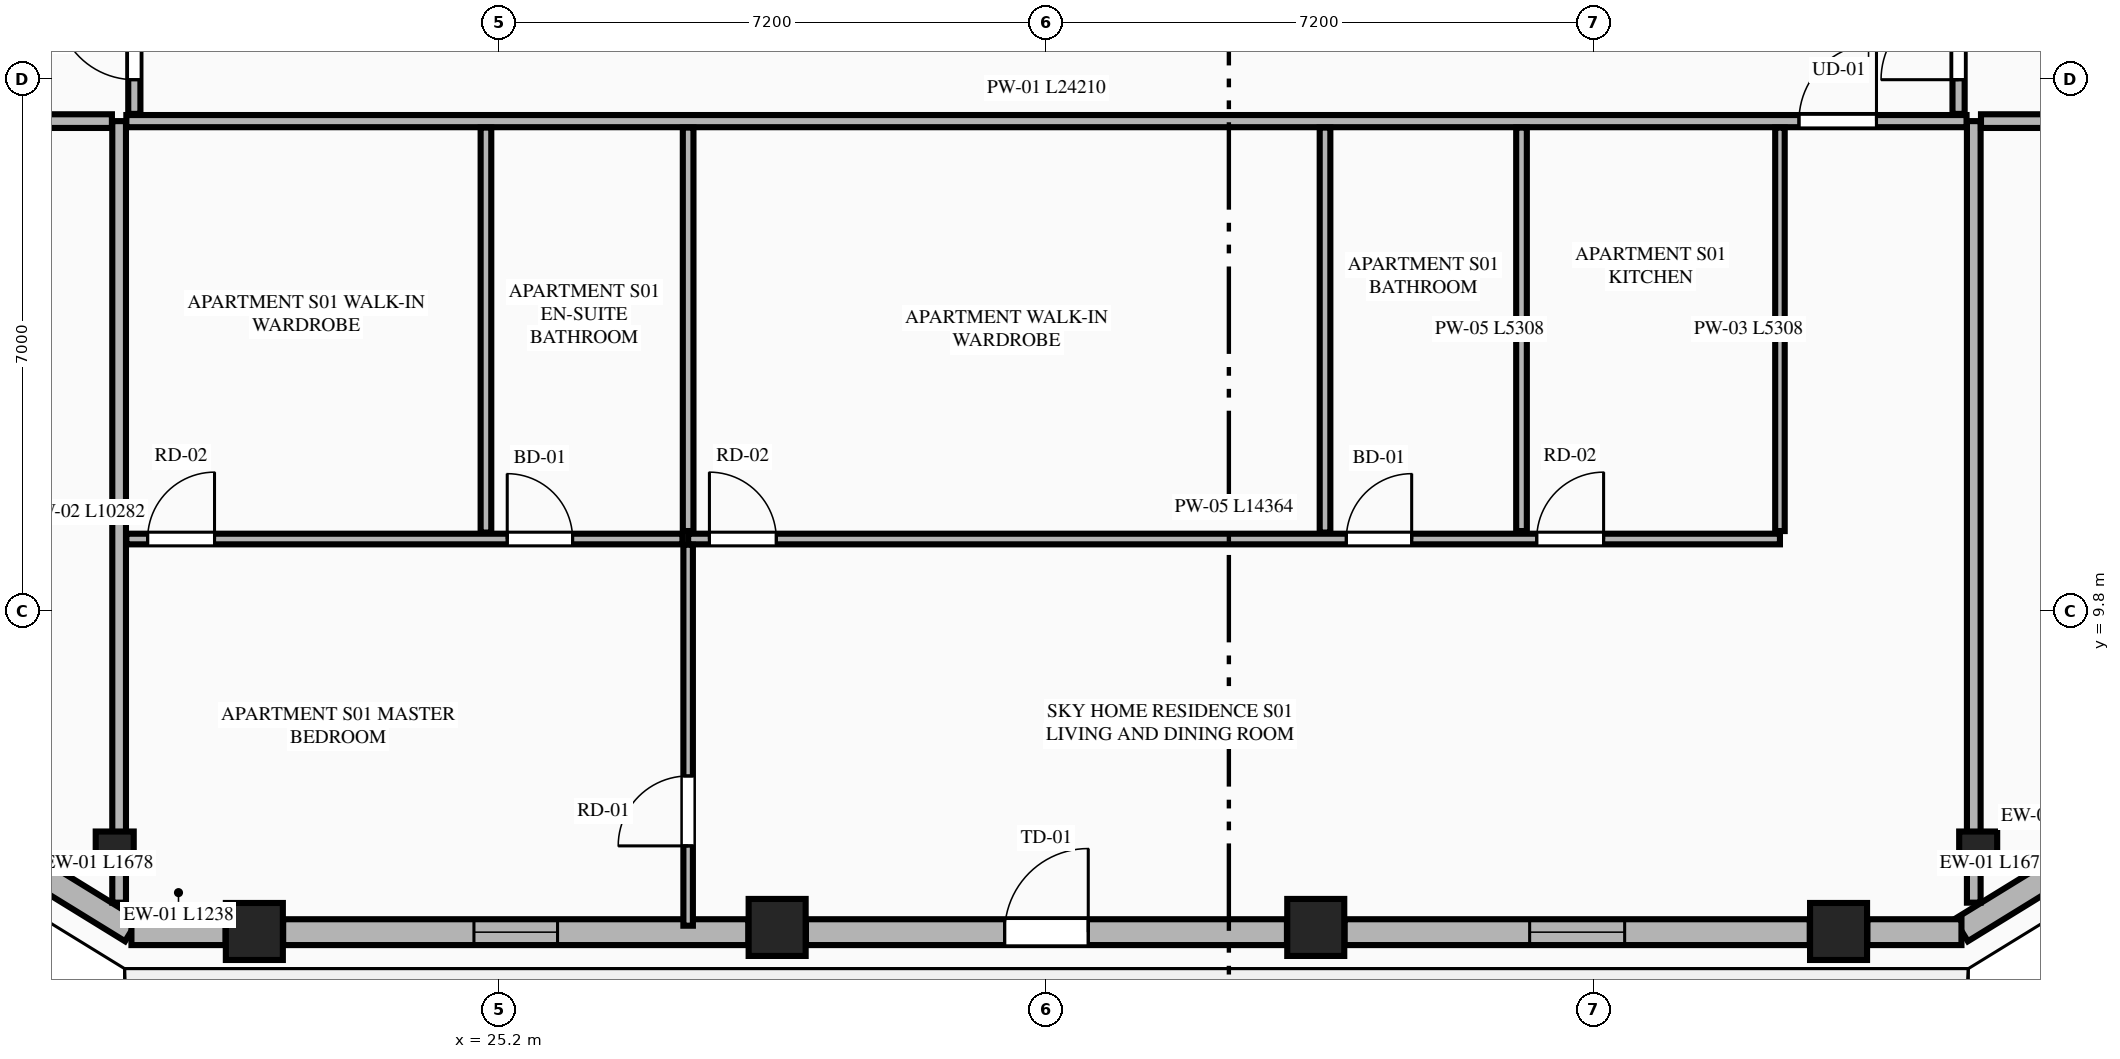
"""IFC4 building model, lengths in metres.
Left out: names, types, materials, properties, quantities, classifications, styles, units other than length and angle.
Written with IfcOpenShell. Run it as: python <this file> out.ifc"""

import sys

from ifc_helpers import new_model, si_unit, direction, frame, frame_2d, origin, origin_2d, place, context, subcontext, project, spatial, rectangle, extrude, element, fill, save


model = new_model("IFC4")
c1 = context("Model", 3, precision=1e-05, world=origin(), true_north=direction((0.0, 1.0)))
c2 = subcontext(c1, "Body", "Model", "MODEL_VIEW")
j1 = project(units=[si_unit("LENGTHUNIT", "METRE"), si_unit("PLANEANGLEUNIT", "RADIAN")], contexts=[c1])
p1 = place(None, origin())
s1 = spatial("IfcSite", under=j1, at=p1, CompositionType="ELEMENT")
p2 = place(p1, origin())
s2 = spatial("IfcBuilding", under=s1, at=p2, CompositionType="ELEMENT")
p3 = place(p2, frame((0.0, 0.0, 207.4)))
s3 = spatial("IfcBuildingStorey", under=s2, at=p3, CompositionType="ELEMENT", Elevation=207.4)
for number, where, z_axis, x_axis in (
    (1, (21.979, 5.589, 0.0), (0.0, 0.0, 1.0), (1.0, 0.0, 0.0)),
    (2, (28.857, 5.642, 0.0), (0.0, 0.0, 1.0), (1.0, 0.0, 0.0)),
    (3, (35.943, 5.642, 0.0), (0.0, 0.0, 1.0), (1.0, 0.0, 0.0)),
    (4, (42.821, 5.589, 0.0), (0.0, 0.0, 1.0), (1.0, 0.0, 0.0)),
):
    element("IfcColumn", number, at=place(p3, frame(where, z_axis=z_axis, x_axis=x_axis)), inside=s3, PredefinedType="COLUMN", context=c2, shape_type="SweptSolid", body=[
        extrude(rectangle(XDim=0.75, YDim=0.75, at=origin_2d()), origin(), (0.0, 0.0, 1.0), 3.55),
    ])
for number, where, z_axis, x_axis in (
    (5, (20.142, 6.654, 0.0), (0.0, 0.0, 1.0), (0.865, -0.501, 0.0)),
    (6, (44.658, 6.654, 0.0), (0.0, 0.0, 1.0), (0.865, 0.501, 0.0)),
):
    element("IfcColumn", number, at=place(p3, frame(where, z_axis=z_axis, x_axis=x_axis)), inside=s3, PredefinedType="PILASTER", context=c2, shape_type="SweptSolid", body=[
        extrude(rectangle(XDim=0.5, YDim=0.35, at=origin_2d()), origin(), (0.0, 0.0, 1.0), 3.55),
    ])
for number, where, z_axis, x_axis in (
    (7, (18.938, 6.484, 0.0), (0.0, 0.0, 1.0), (0.852, -0.524, 0.0)),
    (8, (44.433, 5.605, 0.0), (0.0, 0.0, 1.0), (0.852, 0.524, 0.0)),
):
    element("IfcWall", number, at=place(p3, frame(where, z_axis=z_axis, x_axis=x_axis)), inside=s3, PredefinedType="STANDARD", context=c2, shape_type="SweptSolid", body=[
        extrude(rectangle(XDim=1.678, YDim=0.34, at=frame_2d((0.839, 0.0))), origin(), (0.0, 0.0, 1.0), 3.35),
    ])
p4 = place(p3, frame((20.362, 5.58, 0.0), z_axis=(0.0, 0.0, 1.0), x_axis=(1.0, 0.0, 0.0)))
e9 = element("IfcWall", 9, at=p4, inside=s3, PredefinedType="STANDARD", context=c2, shape_type="SweptSolid", body=[
    extrude(rectangle(XDim=1.238, YDim=0.34, at=frame_2d((0.619, 0.0))), origin(), (0.0, 0.0, 1.0), 3.35),
])
p5 = place(p3, frame((22.358, 5.58, 0.0), z_axis=(0.0, 0.0, 1.0), x_axis=(1.0, 0.0, 0.0)))
e10 = element("IfcWall", 10, at=p5, inside=s3, PredefinedType="STANDARD", context=c2, shape_type="SweptSolid", body=[
    extrude(rectangle(XDim=6.12, YDim=0.34, at=frame_2d((3.06, 0.0))), origin(), (0.0, 0.0, 1.0), 2.883),
])
p6 = place(p5, frame((2.51, 0.0, 0.75)))
e11 = element("IfcOpeningElement", 11, at=p6, cuts=e10, PredefinedType="OPENING", context=c2, shape_type="SweptSolid", body=[
    extrude(rectangle(XDim=1.1, YDim=1.983, at=frame_2d((0.55, 0.991))), frame((0.0, 0.18, 0.0), z_axis=(0.0, -1.0, 0.0), x_axis=(1.0, 0.0, 0.0)), (0.0, 0.0, 1.0), 0.36),
])
p7 = place(p3, frame((29.236, 5.58, 0.0), z_axis=(0.0, 0.0, 1.0), x_axis=(1.0, 0.0, 0.0)))
e12 = element("IfcWall", 12, at=p7, inside=s3, PredefinedType="STANDARD", context=c2, shape_type="SweptSolid", body=[
    extrude(rectangle(XDim=6.328, YDim=0.34, at=frame_2d((3.164, 0.0))), origin(), (0.0, 0.0, 1.0), 2.883),
])
p8 = place(p7, frame((2.614, 0.0, 0.0)))
e13 = element("IfcOpeningElement", 13, at=p8, cuts=e12, PredefinedType="OPENING", context=c2, shape_type="SweptSolid", body=[
    extrude(rectangle(XDim=1.1, YDim=2.25, at=frame_2d((0.55, 1.125))), frame((0.0, 0.18, 0.0), z_axis=(0.0, -1.0, 0.0), x_axis=(1.0, 0.0, 0.0)), (0.0, 0.0, 1.0), 0.36),
])
p9 = place(p3, frame((36.322, 5.58, 0.0), z_axis=(0.0, 0.0, 1.0), x_axis=(1.0, 0.0, 0.0)))
e14 = element("IfcWall", 14, at=p9, inside=s3, PredefinedType="STANDARD", context=c2, shape_type="SweptSolid", body=[
    extrude(rectangle(XDim=6.12, YDim=0.34, at=frame_2d((3.06, 0.0))), origin(), (0.0, 0.0, 1.0), 2.883),
])
p10 = place(p9, frame((2.435, 0.0, 0.75)))
e15 = element("IfcOpeningElement", 15, at=p10, cuts=e14, PredefinedType="OPENING", context=c2, shape_type="SweptSolid", body=[
    extrude(rectangle(XDim=1.25, YDim=1.95, at=frame_2d((0.625, 0.975))), frame((0.0, 0.18, 0.0), z_axis=(0.0, -1.0, 0.0), x_axis=(1.0, 0.0, 0.0)), (0.0, 0.0, 1.0), 0.36),
])
p11 = place(p3, frame((43.2, 5.58, 0.0), z_axis=(0.0, 0.0, 1.0), x_axis=(1.0, 0.0, 0.0)))
e16 = element("IfcWall", 16, at=p11, inside=s3, PredefinedType="STANDARD", context=c2, shape_type="SweptSolid", body=[
    extrude(rectangle(XDim=1.238, YDim=0.34, at=frame_2d((0.619, 0.0))), origin(), (0.0, 0.0, 1.0), 3.35),
])
for number, where, z_axis, x_axis in (
    (17, (20.2, 5.968, 0.0), (0.0, 0.0, 1.0), (0.0, 1.0, 0.0)),
    (18, (44.6, 5.968, 0.0), (0.0, 0.0, 1.0), (0.0, 1.0, 0.0)),
):
    element("IfcWall", number, at=place(p3, frame(where, z_axis=z_axis, x_axis=x_axis)), inside=s3, PredefinedType="PARTITIONING", context=c2, shape_type="SweptSolid", body=[
        extrude(rectangle(XDim=10.282, YDim=0.18, at=frame_2d((5.141, 0.0))), origin(), (0.0, 0.0, 1.0), 3.35),
    ])
p12 = place(p3, frame((20.295, 16.25, 0.0), z_axis=(0.0, 0.0, 1.0), x_axis=(1.0, 0.0, 0.0)))
e19 = element("IfcWall", 19, at=p12, inside=s3, PredefinedType="PARTITIONING", context=c2, shape_type="SweptSolid", body=[
    extrude(rectangle(XDim=24.21, YDim=0.16, at=frame_2d((12.105, 0.0))), origin(), (0.0, 0.0, 1.0), 3.35),
])
p13 = place(p12, frame((22.005, 0.0, 0.0)))
e20 = element("IfcOpeningElement", 20, at=p13, cuts=e19, PredefinedType="OPENING", context=c2, shape_type="SweptSolid", body=[
    extrude(rectangle(XDim=1.02, YDim=2.25, at=frame_2d((0.51, 1.125))), frame((0.0, 0.09, 0.0), z_axis=(0.0, -1.0, 0.0), x_axis=(1.0, 0.0, 0.0)), (0.0, 0.0, 1.0), 0.18),
])
p14 = place(p3, frame((42.05, 10.857, 0.0), z_axis=(0.0, 0.0, 1.0), x_axis=(0.0, 1.0, 0.0)))
e21 = element("IfcWall", 21, at=p14, inside=s3, PredefinedType="PARTITIONING", context=c2, shape_type="SweptSolid", body=[
    extrude(rectangle(XDim=5.308, YDim=0.125, at=frame_2d((2.654, 0.0))), origin(), (0.0, 0.0, 1.0), 2.807),
])
p15 = place(p3, frame((27.686, 10.752, 0.0), z_axis=(0.0, 0.0, 1.0), x_axis=(1.0, 0.0, 0.0)))
e22 = element("IfcWall", 22, at=p15, inside=s3, PredefinedType="PLUMBINGWALL", context=c2, shape_type="SweptSolid", body=[
    extrude(rectangle(XDim=14.364, YDim=0.14, at=frame_2d((7.182, 0.0))), origin(), (0.0, 0.0, 1.0), 3.35),
])
p16 = place(p15, frame((0.28, 0.0, 0.0)))
e23 = element("IfcOpeningElement", 23, at=p16, cuts=e22, PredefinedType="OPENING", context=c2, shape_type="SweptSolid", body=[
    extrude(rectangle(XDim=0.88, YDim=2.15, at=frame_2d((0.44, 1.075))), frame((0.0, 0.08, 0.0), z_axis=(0.0, -1.0, 0.0), x_axis=(1.0, 0.0, 0.0)), (0.0, 0.0, 1.0), 0.16),
])
p17 = place(p15, frame((8.659, 0.0, 0.0)))
e24 = element("IfcOpeningElement", 24, at=p17, cuts=e22, PredefinedType="OPENING", context=c2, shape_type="SweptSolid", body=[
    extrude(rectangle(XDim=0.86, YDim=2.1, at=frame_2d((0.43, 1.05))), frame((0.0, 0.08, 0.0), z_axis=(0.0, -1.0, 0.0), x_axis=(1.0, 0.0, 0.0)), (0.0, 0.0, 1.0), 0.16),
])
p18 = place(p15, frame((11.164, 0.0, 0.0)))
e25 = element("IfcOpeningElement", 25, at=p18, cuts=e22, PredefinedType="OPENING", context=c2, shape_type="SweptSolid", body=[
    extrude(rectangle(XDim=0.88, YDim=2.15, at=frame_2d((0.44, 1.075))), frame((0.0, 0.08, 0.0), z_axis=(0.0, -1.0, 0.0), x_axis=(1.0, 0.0, 0.0)), (0.0, 0.0, 1.0), 0.16),
])
p19 = place(p3, frame((20.295, 10.752, 0.0), z_axis=(0.0, 0.0, 1.0), x_axis=(1.0, 0.0, 0.0)))
e26 = element("IfcWall", 26, at=p19, inside=s3, PredefinedType="PLUMBINGWALL", context=c2, shape_type="SweptSolid", body=[
    extrude(rectangle(XDim=7.316, YDim=0.14, at=frame_2d((3.658, 0.0))), origin(), (0.0, 0.0, 1.0), 3.35),
])
p20 = place(p19, frame((0.28, 0.0, 0.0)))
e27 = element("IfcOpeningElement", 27, at=p20, cuts=e26, PredefinedType="OPENING", context=c2, shape_type="SweptSolid", body=[
    extrude(rectangle(XDim=0.88, YDim=2.15, at=frame_2d((0.44, 1.075))), frame((0.0, 0.08, 0.0), z_axis=(0.0, -1.0, 0.0), x_axis=(1.0, 0.0, 0.0)), (0.0, 0.0, 1.0), 0.16),
])
p21 = place(p19, frame((5.011, 0.0, 0.0)))
e28 = element("IfcOpeningElement", 28, at=p21, cuts=e26, PredefinedType="OPENING", context=c2, shape_type="SweptSolid", body=[
    extrude(rectangle(XDim=0.86, YDim=2.1, at=frame_2d((0.43, 1.05))), frame((0.0, 0.08, 0.0), z_axis=(0.0, -1.0, 0.0), x_axis=(1.0, 0.0, 0.0)), (0.0, 0.0, 1.0), 0.16),
])
for number, where, z_axis, x_axis in (
    (29, (38.65, 10.857, 0.0), (0.0, 0.0, 1.0), (0.0, 1.0, 0.0)),
    (30, (27.686, 10.857, 0.0), (0.0, 0.0, 1.0), (0.0, 1.0, 0.0)),
):
    element("IfcWall", number, at=place(p3, frame(where, z_axis=z_axis, x_axis=x_axis)), inside=s3, PredefinedType="PLUMBINGWALL", context=c2, shape_type="SweptSolid", body=[
        extrude(rectangle(XDim=5.308, YDim=0.14, at=frame_2d((2.654, 0.0))), origin(), (0.0, 0.0, 1.0), 3.35),
    ])
p22 = place(p3, frame((27.686, 5.665, 0.0), z_axis=(0.0, 0.0, 1.0), x_axis=(0.0, 1.0, 0.0)))
e31 = element("IfcWall", 31, at=p22, inside=s3, PredefinedType="PARTITIONING", context=c2, shape_type="SweptSolid", body=[
    extrude(rectangle(XDim=5.012, YDim=0.125, at=frame_2d((2.506, 0.0))), origin(), (0.0, 0.0, 1.0), 3.35),
])
p23 = place(p22, frame((1.05, 0.0, 0.0)))
e32 = element("IfcOpeningElement", 32, at=p23, cuts=e31, PredefinedType="OPENING", context=c2, shape_type="SweptSolid", body=[
    extrude(rectangle(XDim=0.92, YDim=2.15, at=frame_2d((0.46, 1.075))), frame((0.0, 0.073, 0.0), z_axis=(0.0, -1.0, 0.0), x_axis=(1.0, 0.0, 0.0)), (0.0, 0.0, 1.0), 0.145),
])
p24 = place(p3, frame((36.065, 10.837, 0.0), z_axis=(0.0, 0.0, 1.0), x_axis=(0.0, 1.0, 0.0)))
e33 = element("IfcWall", 33, at=p24, inside=s3, PredefinedType="PLUMBINGWALL", context=c2, shape_type="SweptSolid", body=[
    extrude(rectangle(XDim=5.328, YDim=0.14, at=frame_2d((2.664, 0.0))), origin(), (0.0, 0.0, 1.0), 2.807),
])
p25 = place(p3, frame((25.026, 10.837, 0.0), z_axis=(0.0, 0.0, 1.0), x_axis=(0.0, 1.0, 0.0)))
e34 = element("IfcWall", 34, at=p25, inside=s3, PredefinedType="PLUMBINGWALL", context=c2, shape_type="SweptSolid", body=[
    extrude(rectangle(XDim=5.328, YDim=0.14, at=frame_2d((2.664, 0.0))), origin(), (0.0, 0.0, 1.0), 3.35),
])
for number, where, z_axis, x_axis in (
    (35, (14.211, 16.25, 0.0), (0.0, 0.0, 1.0), (1.0, 0.0, 0.0)),
    (36, (44.695, 16.25, 0.0), (0.0, 0.0, 1.0), (1.0, 0.0, 0.0)),
):
    element("IfcWall", number, at=place(p3, frame(where, z_axis=z_axis, x_axis=x_axis)), inside=s3, PredefinedType="PARTITIONING", context=c2, shape_type="SweptSolid", body=[
        extrude(rectangle(XDim=5.894, YDim=0.18, at=frame_2d((2.947, 0.0))), origin(), (0.0, 0.0, 1.0), 3.35),
    ])
p26 = place(p3, frame((20.4, 16.345, 0.0), z_axis=(0.0, 0.0, 1.0), x_axis=(0.0, 1.0, 0.0)))
e37 = element("IfcWall", 37, at=p26, inside=s3, PredefinedType="PARTITIONING", context=c2, shape_type="SweptSolid", body=[
    extrude(rectangle(XDim=18.71, YDim=0.16, at=frame_2d((9.355, 0.0))), origin(), (0.0, 0.0, 1.0), 3.35),
])
p27 = place(p26, frame((0.45, 0.0, 0.0)))
e38 = element("IfcOpeningElement", 38, at=p27, cuts=e37, PredefinedType="OPENING", context=c2, shape_type="SweptSolid", body=[
    extrude(rectangle(XDim=1.02, YDim=2.25, at=frame_2d((0.51, 1.125))), frame((0.0, 0.09, 0.0), z_axis=(0.0, -1.0, 0.0), x_axis=(1.0, 0.0, 0.0)), (0.0, 0.0, 1.0), 0.18),
])
p28 = place(p3, frame((44.4, 16.345, 0.0), z_axis=(0.0, 0.0, 1.0), x_axis=(0.0, 1.0, 0.0)))
e39 = element("IfcWall", 39, at=p28, inside=s3, PredefinedType="PARTITIONING", context=c2, shape_type="SweptSolid", body=[
    extrude(rectangle(XDim=18.71, YDim=0.16, at=frame_2d((9.355, 0.0))), origin(), (0.0, 0.0, 1.0), 3.35),
])
p29 = place(p28, frame((0.45, 0.0, 0.0)))
e40 = element("IfcOpeningElement", 40, at=p29, cuts=e39, PredefinedType="OPENING", context=c2, shape_type="SweptSolid", body=[
    extrude(rectangle(XDim=1.02, YDim=2.25, at=frame_2d((0.51, 1.125))), frame((0.0, 0.09, 0.0), z_axis=(0.0, -1.0, 0.0), x_axis=(1.0, 0.0, 0.0)), (0.0, 0.0, 1.0), 0.18),
])
p30 = place(p6, origin())
e41 = element("IfcWindow", 41, at=p30, inside=s3, PartitioningType="SINGLE_PANEL", PredefinedType="WINDOW", context=c2, shape_type="SweptSolid", body=[
    extrude(rectangle(XDim=1.1, YDim=1.983, at=frame_2d((0.55, 0.991))), frame((0.0, 0.03, 0.0), z_axis=(0.0, -1.0, 0.0), x_axis=(1.0, 0.0, 0.0)), (0.0, 0.0, 1.0), 0.06),
])
fill(e11, e41)
p31 = place(p8, origin())
e42 = element("IfcDoor", 42, at=p31, inside=s3, OperationType="SINGLE_SWING_RIGHT", PredefinedType="DOOR", context=c2, shape_type="SweptSolid", body=[
    extrude(rectangle(XDim=1.1, YDim=2.25, at=frame_2d((0.55, 1.125))), frame((0.0, 0.025, 0.0), z_axis=(0.0, -1.0, 0.0), x_axis=(1.0, 0.0, 0.0)), (0.0, 0.0, 1.0), 0.05),
])
fill(e13, e42)
p32 = place(p10, origin())
e43 = element("IfcWindow", 43, at=p32, inside=s3, PartitioningType="SINGLE_PANEL", PredefinedType="WINDOW", context=c2, shape_type="SweptSolid", body=[
    extrude(rectangle(XDim=1.25, YDim=1.95, at=frame_2d((0.625, 0.975))), frame((0.0, 0.03, 0.0), z_axis=(0.0, -1.0, 0.0), x_axis=(1.0, 0.0, 0.0)), (0.0, 0.0, 1.0), 0.06),
])
fill(e15, e43)
p33 = place(p16, origin())
e44 = element("IfcDoor", 44, at=p33, inside=s3, OperationType="SINGLE_SWING_LEFT", PredefinedType="DOOR", context=c2, shape_type="SweptSolid", body=[
    extrude(rectangle(XDim=0.88, YDim=2.15, at=frame_2d((0.44, 1.075))), frame((0.0, 0.025, 0.0), z_axis=(0.0, -1.0, 0.0), x_axis=(1.0, 0.0, 0.0)), (0.0, 0.0, 1.0), 0.05),
])
fill(e23, e44)
p34 = place(p17, origin())
e45 = element("IfcDoor", 45, at=p34, inside=s3, OperationType="SINGLE_SWING_RIGHT", PredefinedType="DOOR", context=c2, shape_type="SweptSolid", body=[
    extrude(rectangle(XDim=0.86, YDim=2.1, at=frame_2d((0.43, 1.05))), frame((0.0, 0.025, 0.0), z_axis=(0.0, -1.0, 0.0), x_axis=(1.0, 0.0, 0.0)), (0.0, 0.0, 1.0), 0.05),
])
fill(e24, e45)
p35 = place(p20, origin())
e46 = element("IfcDoor", 46, at=p35, inside=s3, OperationType="SINGLE_SWING_RIGHT", PredefinedType="DOOR", context=c2, shape_type="SweptSolid", body=[
    extrude(rectangle(XDim=0.88, YDim=2.15, at=frame_2d((0.44, 1.075))), frame((0.0, 0.025, 0.0), z_axis=(0.0, -1.0, 0.0), x_axis=(1.0, 0.0, 0.0)), (0.0, 0.0, 1.0), 0.05),
])
fill(e27, e46)
p36 = place(p21, origin())
e47 = element("IfcDoor", 47, at=p36, inside=s3, OperationType="SINGLE_SWING_LEFT", PredefinedType="DOOR", context=c2, shape_type="SweptSolid", body=[
    extrude(rectangle(XDim=0.86, YDim=2.1, at=frame_2d((0.43, 1.05))), frame((0.0, 0.025, 0.0), z_axis=(0.0, -1.0, 0.0), x_axis=(1.0, 0.0, 0.0)), (0.0, 0.0, 1.0), 0.05),
])
fill(e28, e47)
p37 = place(p13, origin())
e48 = element("IfcDoor", 48, at=p37, inside=s3, OperationType="SINGLE_SWING_RIGHT", PredefinedType="DOOR", context=c2, shape_type="SweptSolid", body=[
    extrude(rectangle(XDim=1.02, YDim=2.25, at=frame_2d((0.51, 1.125))), frame((0.0, 0.025, 0.0), z_axis=(0.0, -1.0, 0.0), x_axis=(1.0, 0.0, 0.0)), (0.0, 0.0, 1.0), 0.05),
])
fill(e20, e48)
p38 = place(p18, origin())
e49 = element("IfcDoor", 49, at=p38, inside=s3, OperationType="SINGLE_SWING_RIGHT", PredefinedType="DOOR", context=c2, shape_type="SweptSolid", body=[
    extrude(rectangle(XDim=0.88, YDim=2.15, at=frame_2d((0.44, 1.075))), frame((0.0, 0.025, 0.0), z_axis=(0.0, -1.0, 0.0), x_axis=(1.0, 0.0, 0.0)), (0.0, 0.0, 1.0), 0.05),
])
fill(e25, e49)
p39 = place(p23, origin())
e50 = element("IfcDoor", 50, at=p39, inside=s3, OperationType="SINGLE_SWING_LEFT", PredefinedType="DOOR", context=c2, shape_type="SweptSolid", body=[
    extrude(rectangle(XDim=0.92, YDim=2.15, at=frame_2d((0.46, 1.075))), frame((0.0, 0.025, 0.0), z_axis=(0.0, -1.0, 0.0), x_axis=(1.0, 0.0, 0.0)), (0.0, 0.0, 1.0), 0.05),
])
fill(e32, e50)
p40 = place(p27, origin())
e51 = element("IfcDoor", 51, at=p40, inside=s3, OperationType="SINGLE_SWING_RIGHT", PredefinedType="DOOR", context=c2, shape_type="SweptSolid", body=[
    extrude(rectangle(XDim=1.02, YDim=2.25, at=frame_2d((0.51, 1.125))), frame((0.0, 0.025, 0.0), z_axis=(0.0, -1.0, 0.0), x_axis=(1.0, 0.0, 0.0)), (0.0, 0.0, 1.0), 0.05),
])
fill(e38, e51)
p41 = place(p29, origin())
e52 = element("IfcDoor", 52, at=p41, inside=s3, OperationType="SINGLE_SWING_LEFT", PredefinedType="DOOR", context=c2, shape_type="SweptSolid", body=[
    extrude(rectangle(XDim=1.02, YDim=2.25, at=frame_2d((0.51, 1.125))), frame((0.0, 0.025, 0.0), z_axis=(0.0, -1.0, 0.0), x_axis=(1.0, 0.0, 0.0)), (0.0, 0.0, 1.0), 0.05),
])
fill(e40, e52)
save(model, sys.argv[1])
